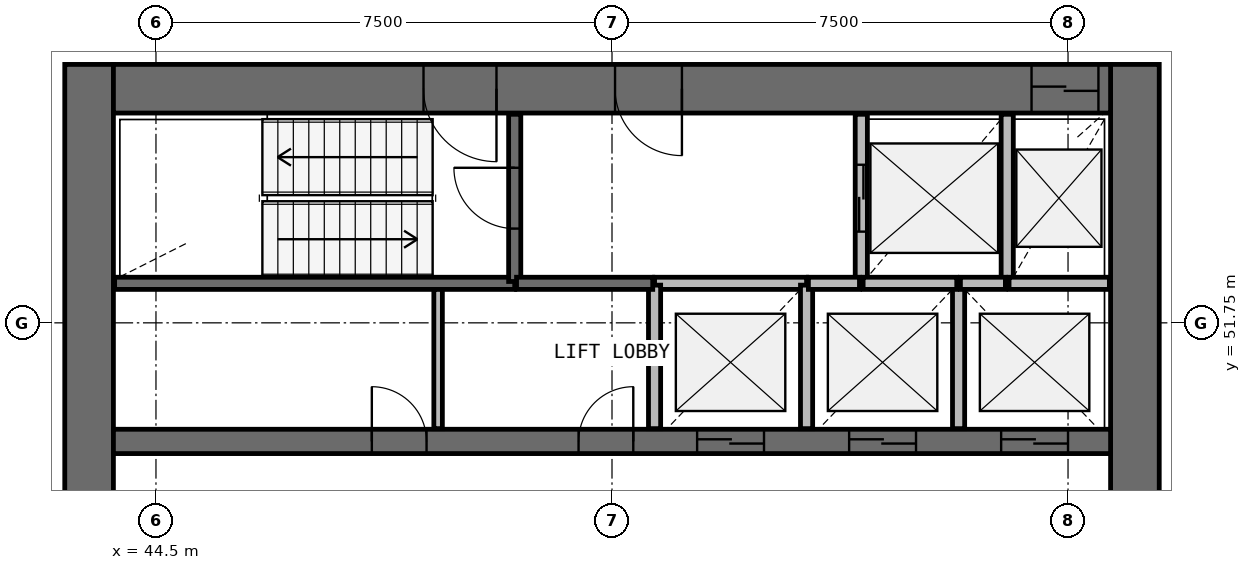
"""IFC4 building model, lengths in metres.
Left out: names, types, materials, properties, quantities, classifications, styles, units other than length and angle.
Written with IfcOpenShell. Run it as: python <this file> out.ifc"""

import sys

from ifc_helpers import new_model, si_unit, direction, frame, frame_2d, origin, place, context, subcontext, project, spatial, rectangle, extrude, source, transform, mapped, element, fill, save


model = new_model("IFC4")
c1 = context("Model", 3, precision=1e-05, world=origin(), true_north=direction((0.0, 1.0)))
c2 = subcontext(c1, "Body", "Model", "MODEL_VIEW")
j1 = project(units=[si_unit("LENGTHUNIT", "METRE"), si_unit("PLANEANGLEUNIT", "RADIAN")], contexts=[c1])
p1 = place(None, origin())
s1 = spatial("IfcSite", under=j1, at=p1, CompositionType="ELEMENT")
p2 = place(p1, origin())
s2 = spatial("IfcBuilding", under=s1, at=p2, CompositionType="ELEMENT")
p3 = place(p2, frame((0.0, 0.0, 164.3)))
s3 = spatial("IfcBuildingStorey", under=s2, at=p3, CompositionType="ELEMENT", Elevation=164.3)
p4 = place(p3, frame((60.6, 40.0, 0.0), z_axis=(0.0, 0.0, 1.0), x_axis=(0.0, 1.0, 0.0)))
e1 = element("IfcWall", 1, at=p4, inside=s3, PredefinedType="SHEAR", context=c2, shape_type="SweptSolid", body=[
    extrude(rectangle(XDim=16.0, YDim=0.8, at=frame_2d((8.0, 0.0))), origin(), (0.0, 0.0, 1.0), 3.9),
])
p5 = place(p4, frame((7.1, 0.0, 0.0)))
e2 = element("IfcOpeningElement", 2, at=p5, cuts=e1, PredefinedType="OPENING", context=c2, shape_type="SweptSolid", body=[
    extrude(rectangle(XDim=1.8, YDim=2.1, at=frame_2d((0.9, 1.05))), frame((0.0, 0.41, 0.0), z_axis=(0.0, -1.0, 0.0), x_axis=(1.0, 0.0, 0.0)), (0.0, 0.0, 1.0), 0.82),
])
p6 = place(p3, frame((43.4, 56.0, 0.0), z_axis=(0.0, 0.0, 1.0), x_axis=(0.0, -1.0, 0.0)))
e3 = element("IfcWall", 3, at=p6, inside=s3, PredefinedType="SHEAR", context=c2, shape_type="SweptSolid", body=[
    extrude(rectangle(XDim=16.0, YDim=0.8, at=frame_2d((8.0, 0.0))), origin(), (0.0, 0.0, 1.0), 3.9),
])
p7 = place(p6, frame((7.1, 0.0, 0.0)))
e4 = element("IfcOpeningElement", 4, at=p7, cuts=e3, PredefinedType="OPENING", context=c2, shape_type="SweptSolid", body=[
    extrude(rectangle(XDim=1.8, YDim=2.1, at=frame_2d((0.9, 1.05))), frame((0.0, 0.41, 0.0), z_axis=(0.0, -1.0, 0.0), x_axis=(1.0, 0.0, 0.0)), (0.0, 0.0, 1.0), 0.82),
])
p8 = place(p3, frame((60.2, 55.6, 0.0), z_axis=(0.0, 0.0, 1.0), x_axis=(-1.0, 0.0, 0.0)))
e5 = element("IfcWall", 5, at=p8, inside=s3, PredefinedType="SHEAR", context=c2, shape_type="SweptSolid", body=[
    extrude(rectangle(XDim=16.4, YDim=0.8, at=frame_2d((8.2, 0.0))), origin(), (0.0, 0.0, 1.0), 3.9),
])
p9 = place(p8, frame((0.2, 0.0, 0.0)))
e6 = element("IfcOpeningElement", 6, at=p9, cuts=e5, PredefinedType="OPENING", context=c2, shape_type="SweptSolid", body=[
    extrude(rectangle(XDim=1.1, YDim=2.1, at=frame_2d((0.55, 1.05))), frame((0.0, 0.41, 0.0), z_axis=(0.0, -1.0, 0.0), x_axis=(1.0, 0.0, 0.0)), (0.0, 0.0, 1.0), 0.82),
])
p10 = place(p8, frame((10.1, 0.0, 0.0)))
e7 = element("IfcOpeningElement", 7, at=p10, cuts=e5, PredefinedType="OPENING", context=c2, shape_type="SweptSolid", body=[
    extrude(rectangle(XDim=1.2, YDim=2.1, at=frame_2d((0.6, 1.05))), frame((0.0, 0.41, 0.0), z_axis=(0.0, -1.0, 0.0), x_axis=(1.0, 0.0, 0.0)), (0.0, 0.0, 1.0), 0.82),
])
p11 = place(p8, frame((7.05, 0.0, 0.0)))
e8 = element("IfcOpeningElement", 8, at=p11, cuts=e5, PredefinedType="OPENING", context=c2, shape_type="SweptSolid", body=[
    extrude(rectangle(XDim=1.1, YDim=2.1, at=frame_2d((0.55, 1.05))), frame((0.0, 0.41, 0.0), z_axis=(0.0, -1.0, 0.0), x_axis=(1.0, 0.0, 0.0)), (0.0, 0.0, 1.0), 0.82),
])
p12 = place(p3, frame((43.8, 49.8, 0.0), z_axis=(0.0, 0.0, 1.0), x_axis=(1.0, 0.0, 0.0)))
e9 = element("IfcWall", 9, at=p12, inside=s3, PredefinedType="SHEAR", context=c2, shape_type="SweptSolid", body=[
    extrude(rectangle(XDim=16.4, YDim=0.4, at=frame_2d((8.2, 0.0))), origin(), (0.0, 0.0, 1.0), 3.9),
])
p13 = place(p12, frame((9.6, 0.0, 0.0)))
e10 = element("IfcOpeningElement", 10, at=p13, cuts=e9, PredefinedType="OPENING", context=c2, shape_type="SweptSolid", body=[
    extrude(rectangle(XDim=1.1, YDim=2.1, at=frame_2d((0.55, 1.05))), frame((0.0, 0.21, 0.0), z_axis=(0.0, -1.0, 0.0), x_axis=(1.0, 0.0, 0.0)), (0.0, 0.0, 1.0), 0.42),
])
p14 = place(p12, frame((12.1, 0.0, 0.0)))
e11 = element("IfcOpeningElement", 11, at=p14, cuts=e9, PredefinedType="OPENING", context=c2, shape_type="SweptSolid", body=[
    extrude(rectangle(XDim=1.1, YDim=2.1, at=frame_2d((0.55, 1.05))), frame((0.0, 0.21, 0.0), z_axis=(0.0, -1.0, 0.0), x_axis=(1.0, 0.0, 0.0)), (0.0, 0.0, 1.0), 0.42),
])
p15 = place(p12, frame((14.6, 0.0, 0.0)))
e12 = element("IfcOpeningElement", 12, at=p15, cuts=e9, PredefinedType="OPENING", context=c2, shape_type="SweptSolid", body=[
    extrude(rectangle(XDim=1.1, YDim=2.1, at=frame_2d((0.55, 1.05))), frame((0.0, 0.21, 0.0), z_axis=(0.0, -1.0, 0.0), x_axis=(1.0, 0.0, 0.0)), (0.0, 0.0, 1.0), 0.42),
])
p16 = place(p12, frame((4.25, 0.0, 0.0)))
e13 = element("IfcOpeningElement", 13, at=p16, cuts=e9, PredefinedType="OPENING", context=c2, shape_type="SweptSolid", body=[
    extrude(rectangle(XDim=0.9, YDim=2.1, at=frame_2d((0.45, 1.05))), frame((0.0, 0.21, 0.0), z_axis=(0.0, -1.0, 0.0), x_axis=(1.0, 0.0, 0.0)), (0.0, 0.0, 1.0), 0.42),
])
p17 = place(p12, frame((7.65, 0.0, 0.0)))
e14 = element("IfcOpeningElement", 14, at=p17, cuts=e9, PredefinedType="OPENING", context=c2, shape_type="SweptSolid", body=[
    extrude(rectangle(XDim=0.9, YDim=2.1, at=frame_2d((0.45, 1.05))), frame((0.0, 0.21, 0.0), z_axis=(0.0, -1.0, 0.0), x_axis=(1.0, 0.0, 0.0)), (0.0, 0.0, 1.0), 0.42),
])
p18 = place(p3, frame((43.82, 52.4, 0.0), z_axis=(0.0, 0.0, 1.0), x_axis=(1.0, 0.0, 0.0)))
e15 = element("IfcWall", 15, at=p18, inside=s3, PredefinedType="SOLIDWALL", context=c2, shape_type="SweptSolid", body=[
    extrude(rectangle(XDim=6.58, YDim=0.2, at=frame_2d((3.29, 0.0))), origin(), (0.0, 0.0, 1.0), 3.58),
])
p19 = place(p3, frame((50.4, 52.43, 0.0), z_axis=(0.0, 0.0, 1.0), x_axis=(0.0, 1.0, 0.0)))
e16 = element("IfcWall", 16, at=p19, inside=s3, PredefinedType="SOLIDWALL", context=c2, shape_type="SweptSolid", body=[
    extrude(rectangle(XDim=2.75, YDim=0.2, at=frame_2d((1.375, 0.0))), origin(), (0.0, 0.0, 1.0), 3.58),
])
p20 = place(p19, frame((0.87, 0.0, 0.0)))
e17 = element("IfcOpeningElement", 17, at=p20, cuts=e16, PredefinedType="OPENING", context=c2, shape_type="SweptSolid", body=[
    extrude(rectangle(XDim=1.0, YDim=2.1, at=frame_2d((0.5, 1.05))), frame((0.0, 0.11, 0.0), z_axis=(0.0, -1.0, 0.0), x_axis=(1.0, 0.0, 0.0)), (0.0, 0.0, 1.0), 0.22),
])
p21 = place(p3, frame((56.1, 55.18, 0.0), z_axis=(0.0, 0.0, 1.0), x_axis=(0.0, -1.0, 0.0)))
e18 = element("IfcWall", 18, at=p21, inside=s3, PredefinedType="SOLIDWALL", context=c2, shape_type="SweptSolid", body=[
    extrude(rectangle(XDim=2.78, YDim=0.2, at=frame_2d((1.39, 0.0))), origin(), (0.0, 0.0, 1.0), 3.58),
])
p22 = place(p21, frame((0.83, 0.0, 0.0)))
e19 = element("IfcOpeningElement", 19, at=p22, cuts=e18, PredefinedType="OPENING", context=c2, shape_type="SweptSolid", body=[
    extrude(rectangle(XDim=1.1, YDim=2.1, at=frame_2d((0.55, 1.05))), frame((0.0, 0.11, 0.0), z_axis=(0.0, -1.0, 0.0), x_axis=(1.0, 0.0, 0.0)), (0.0, 0.0, 1.0), 0.22),
])
p23 = place(p3, frame((58.5, 52.4, 0.0), z_axis=(0.0, 0.0, 1.0), x_axis=(0.0, 1.0, 0.0)))
e20 = element("IfcWall", 20, at=p23, inside=s3, PredefinedType="SOLIDWALL", context=c2, shape_type="SweptSolid", body=[
    extrude(rectangle(XDim=2.78, YDim=0.2, at=frame_2d((1.39, 0.0))), origin(), (0.0, 0.0, 1.0), 3.58),
])
p24 = place(p3, frame((55.2, 52.4, 0.0), z_axis=(0.0, 0.0, 1.0), x_axis=(-1.0, 0.0, 0.0)))
e21 = element("IfcWall", 21, at=p24, inside=s3, PredefinedType="SOLIDWALL", context=c2, shape_type="SweptSolid", body=[
    extrude(rectangle(XDim=2.5, YDim=0.2, at=frame_2d((1.25, 0.0))), origin(), (0.0, 0.0, 1.0), 3.58),
])
for number, where, z_axis, x_axis in (
    (22, (52.7, 52.37, 0.0), (0.0, 0.0, 1.0), (0.0, -1.0, 0.0)),
    (23, (55.2, 50.01, 0.0), (0.0, 0.0, 1.0), (0.0, 1.0, 0.0)),
):
    element("IfcWall", number, at=place(p3, frame(where, z_axis=z_axis, x_axis=x_axis)), inside=s3, PredefinedType="SOLIDWALL", context=c2, shape_type="SweptSolid", body=[
        extrude(rectangle(XDim=2.36, YDim=0.2, at=frame_2d((1.18, 0.0))), origin(), (0.0, 0.0, 1.0), 3.58),
    ])
p25 = place(p3, frame((57.7, 50.01, 0.0), z_axis=(0.0, 0.0, 1.0), x_axis=(0.0, 1.0, 0.0)))
e24 = element("IfcWall", 24, at=p25, inside=s3, PredefinedType="SOLIDWALL", context=c2, shape_type="SweptSolid", body=[
    extrude(rectangle(XDim=2.39, YDim=0.2, at=frame_2d((1.195, 0.0))), origin(), (0.0, 0.0, 1.0), 3.58),
])
p26 = place(p3, frame((50.43, 52.4, 0.0), z_axis=(0.0, 0.0, 1.0), x_axis=(1.0, 0.0, 0.0)))
e25 = element("IfcWall", 25, at=p26, inside=s3, PredefinedType="SOLIDWALL", context=c2, shape_type="SweptSolid", body=[
    extrude(rectangle(XDim=2.24, YDim=0.2, at=frame_2d((1.12, 0.0))), origin(), (0.0, 0.0, 1.0), 3.58),
])
p27 = place(p3, frame((60.18, 52.4, 0.0), z_axis=(0.0, 0.0, 1.0), x_axis=(-1.0, 0.0, 0.0)))
e26 = element("IfcWall", 26, at=p27, inside=s3, PredefinedType="SOLIDWALL", context=c2, shape_type="SweptSolid", body=[
    extrude(rectangle(XDim=1.65, YDim=0.2, at=frame_2d((0.825, 0.0))), origin(), (0.0, 0.0, 1.0), 3.58),
])
p28 = place(p3, frame((57.67, 52.4, 0.0), z_axis=(0.0, 0.0, 1.0), x_axis=(-1.0, 0.0, 0.0)))
e27 = element("IfcWall", 27, at=p28, inside=s3, PredefinedType="SOLIDWALL", context=c2, shape_type="SweptSolid", body=[
    extrude(rectangle(XDim=1.54, YDim=0.2, at=frame_2d((0.77, 0.0))), origin(), (0.0, 0.0, 1.0), 3.58),
])
p29 = place(p3, frame((56.07, 52.4, 0.0), z_axis=(0.0, 0.0, 1.0), x_axis=(-1.0, 0.0, 0.0)))
e28 = element("IfcWall", 28, at=p29, inside=s3, PredefinedType="SOLIDWALL", context=c2, shape_type="SweptSolid", body=[
    extrude(rectangle(XDim=0.84, YDim=0.2, at=frame_2d((0.42, 0.0))), origin(), (0.0, 0.0, 1.0), 3.58),
])
p30 = place(p3, frame((58.47, 52.4, 0.0), z_axis=(0.0, 0.0, 1.0), x_axis=(-1.0, 0.0, 0.0)))
e29 = element("IfcWall", 29, at=p30, inside=s3, PredefinedType="SOLIDWALL", context=c2, shape_type="SweptSolid", body=[
    extrude(rectangle(XDim=0.74, YDim=0.2, at=frame_2d((0.37, 0.0))), origin(), (0.0, 0.0, 1.0), 3.58),
])
p31 = place(p3, frame((49.14, 50.01, 0.0), z_axis=(0.0, 0.0, 1.0), x_axis=(0.0, 1.0, 0.0)))
e30 = element("IfcWall", 30, at=p31, inside=s3, PredefinedType="PARTITIONING", context=c2, shape_type="SweptSolid", body=[
    extrude(rectangle(XDim=2.29, YDim=0.14, at=frame_2d((1.145, 0.0))), origin(), (0.0, 0.0, 1.0), 2.88),
])
m1 = source(origin(), c2, "Body", "SweptSolid", [
    extrude(rectangle(XDim=1.1, YDim=2.1, at=frame_2d((0.55, 1.05))), frame((0.0, 0.025, 0.0), z_axis=(0.0, -1.0, 0.0), x_axis=(1.0, 0.0, 0.0)), (0.0, 0.0, 1.0), 0.05),
])
p32 = place(p13, origin())
e31 = element("IfcDoor", 31, at=p32, inside=s3, OperationType="DOUBLE_DOOR_SLIDING", PredefinedType="USERDEFINED", context=c2, shape_type="MappedRepresentation", body=[
    mapped(m1, transform((0.0, 0.0, 0.0), scale=1.0)),
])
fill(e10, e31)
p33 = place(p14, origin())
e32 = element("IfcDoor", 32, at=p33, inside=s3, OperationType="DOUBLE_DOOR_SLIDING", PredefinedType="USERDEFINED", context=c2, shape_type="MappedRepresentation", body=[
    mapped(m1, transform((0.0, 0.0, 0.0), scale=1.0)),
])
fill(e11, e32)
p34 = place(p15, origin())
e33 = element("IfcDoor", 33, at=p34, inside=s3, OperationType="DOUBLE_DOOR_SLIDING", PredefinedType="USERDEFINED", context=c2, shape_type="MappedRepresentation", body=[
    mapped(m1, transform((0.0, 0.0, 0.0), scale=1.0)),
])
fill(e12, e33)
p35 = place(p22, origin())
e34 = element("IfcDoor", 34, at=p35, inside=s3, OperationType="DOUBLE_DOOR_SLIDING", PredefinedType="USERDEFINED", context=c2, shape_type="MappedRepresentation", body=[
    mapped(m1, transform((0.0, 0.0, 0.0), scale=1.0)),
])
fill(e19, e34)
p36 = place(p9, origin())
e35 = element("IfcDoor", 35, at=p36, inside=s3, OperationType="DOUBLE_DOOR_SLIDING", PredefinedType="USERDEFINED", context=c2, shape_type="MappedRepresentation", body=[
    mapped(m1, transform((0.0, 0.0, 0.0), scale=1.0)),
])
fill(e6, e35)
m2 = source(origin(), c2, "Body", "SweptSolid", [
    extrude(rectangle(XDim=1.2, YDim=2.1, at=frame_2d((0.6, 1.05))), frame((0.0, 0.025, 0.0), z_axis=(0.0, -1.0, 0.0), x_axis=(1.0, 0.0, 0.0)), (0.0, 0.0, 1.0), 0.05),
])
p37 = place(p10, origin())
e36 = element("IfcDoor", 36, at=p37, inside=s3, OperationType="SINGLE_SWING_LEFT", PredefinedType="DOOR", context=c2, shape_type="MappedRepresentation", body=[
    mapped(m2, transform((0.0, 0.0, 0.0), scale=1.0)),
])
fill(e7, e36)
m3 = source(origin(), c2, "Body", "SweptSolid", [
    extrude(rectangle(XDim=1.0, YDim=2.1, at=frame_2d((0.5, 1.05))), frame((0.0, 0.025, 0.0), z_axis=(0.0, -1.0, 0.0), x_axis=(1.0, 0.0, 0.0)), (0.0, 0.0, 1.0), 0.05),
])
p38 = place(p20, origin())
e37 = element("IfcDoor", 37, at=p38, inside=s3, OperationType="SINGLE_SWING_RIGHT", PredefinedType="DOOR", context=c2, shape_type="MappedRepresentation", body=[
    mapped(m3, transform((0.0, 0.0, 0.0), scale=1.0)),
])
fill(e17, e37)
m4 = source(origin(), c2, "Body", "SweptSolid", [
    extrude(rectangle(XDim=1.1, YDim=2.1, at=frame_2d((0.55, 1.05))), frame((0.0, 0.025, 0.0), z_axis=(0.0, -1.0, 0.0), x_axis=(1.0, 0.0, 0.0)), (0.0, 0.0, 1.0), 0.05),
])
p39 = place(p11, origin())
e38 = element("IfcDoor", 38, at=p39, inside=s3, OperationType="SINGLE_SWING_LEFT", PredefinedType="DOOR", context=c2, shape_type="MappedRepresentation", body=[
    mapped(m4, transform((0.0, 0.0, 0.0), scale=1.0)),
])
fill(e8, e38)
m5 = source(origin(), c2, "Body", "SweptSolid", [
    extrude(rectangle(XDim=0.9, YDim=2.1, at=frame_2d((0.45, 1.05))), frame((0.0, 0.025, 0.0), z_axis=(0.0, -1.0, 0.0), x_axis=(1.0, 0.0, 0.0)), (0.0, 0.0, 1.0), 0.05),
])
p40 = place(p16, origin())
e39 = element("IfcDoor", 39, at=p40, inside=s3, OperationType="SINGLE_SWING_LEFT", PredefinedType="DOOR", context=c2, shape_type="MappedRepresentation", body=[
    mapped(m5, transform((0.0, 0.0, 0.0), scale=1.0)),
])
fill(e13, e39)
p41 = place(p17, origin())
e40 = element("IfcDoor", 40, at=p41, inside=s3, OperationType="SINGLE_SWING_RIGHT", PredefinedType="DOOR", context=c2, shape_type="MappedRepresentation", body=[
    mapped(m5, transform((0.0, 0.0, 0.0), scale=1.0)),
])
fill(e14, e40)
save(model, sys.argv[1])
